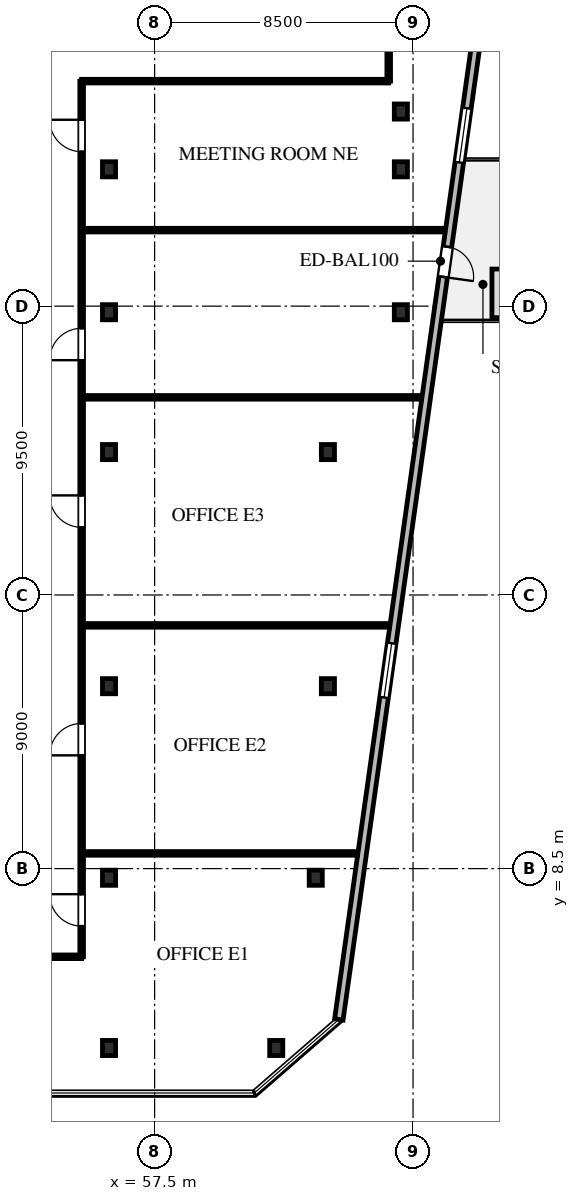
"""IFC4 building model, lengths in metres.
Left out: names, types, materials, properties, quantities, classifications, styles, units other than length and angle.
Written with IfcOpenShell. Run it as: python <this file> out.ifc"""

import sys

from ifc_helpers import new_model, si_unit, direction, frame, frame_2d, origin, origin_2d, place, context, subcontext, project, spatial, rectangle, i_section, extrude, element, fill, save


model = new_model("IFC4")
c1 = context("Model", 3, precision=1e-05, world=origin(), true_north=direction((0.0, 1.0)))
c2 = subcontext(c1, "Body", "Model", "MODEL_VIEW")
j1 = project(units=[si_unit("LENGTHUNIT", "METRE"), si_unit("PLANEANGLEUNIT", "RADIAN")], contexts=[c1])
p1 = place(None, origin())
s1 = spatial("IfcSite", under=j1, at=p1, CompositionType="ELEMENT")
p2 = place(p1, origin())
s2 = spatial("IfcBuilding", under=s1, at=p2, CompositionType="ELEMENT")
p3 = place(p2, frame((0.0, 0.0, 61.5)))
s3 = spatial("IfcBuildingStorey", under=s2, at=p3, CompositionType="ELEMENT", Elevation=61.5)
for number, where, z_axis, x_axis in (
    (1, (56.0, 14.5, 0.0), (0.0, 0.0, 1.0), (1.0, 0.0, 0.0)),
    (2, (63.2, 14.5, 0.0), (0.0, 0.0, 1.0), (1.0, 0.0, 0.0)),
    (3, (56.0, 22.2, 0.0), (0.0, 0.0, 1.0), (1.0, 0.0, 0.0)),
    (4, (63.2, 22.2, 0.0), (0.0, 0.0, 1.0), (1.0, 0.0, 0.0)),
    (5, (56.0, 26.8, 0.0), (0.0, 0.0, 1.0), (1.0, 0.0, 0.0)),
    (6, (65.6, 26.8, 0.0), (0.0, 0.0, 1.0), (1.0, 0.0, 0.0)),
    (7, (56.0, 31.5, 0.0), (0.0, 0.0, 1.0), (1.0, 0.0, 0.0)),
    (8, (65.6, 31.5, 0.0), (0.0, 0.0, 1.0), (1.0, 0.0, 0.0)),
    (9, (56.0, 2.6, 0.0), (0.0, 0.0, 1.0), (1.0, 0.0, 0.0)),
    (10, (61.5, 2.6, 0.0), (0.0, 0.0, 1.0), (1.0, 0.0, 0.0)),
    (11, (56.0, 8.2, 0.0), (0.0, 0.0, 1.0), (1.0, 0.0, 0.0)),
    (12, (62.8, 8.2, 0.0), (0.0, 0.0, 1.0), (1.0, 0.0, 0.0)),
    (13, (65.6, 33.4, 0.0), (0.0, 0.0, 1.0), (1.0, 0.0, 0.0)),
):
    element("IfcColumn", number, at=place(p3, frame(where, z_axis=z_axis, x_axis=x_axis)), inside=s3, PredefinedType="COLUMN", context=c2, shape_type="SweptSolid", body=[
        extrude(i_section(OverallWidth=0.432, OverallDepth=0.498, WebThickness=0.056, FlangeThickness=0.089, FilletRadius=0.03, at=origin_2d()), origin(), (0.0, 0.0, 1.0), 4.0),
    ])
p4 = place(p3, frame((68.375, 37.8, 0.0), z_axis=(0.0, 0.0, 1.0), x_axis=(-0.139174610616, -0.990267856572, 0.0)))
e14 = element("IfcWall", 14, at=p4, inside=s3, PredefinedType="STANDARD", context=c2, shape_type="SweptSolid", body=[
    extrude(rectangle(XDim=34.6, YDim=0.28, at=frame_2d((17.3, 0.0))), origin(), (0.0, 0.0, 1.0), 3.74),
])
p5 = place(p4, frame((8.935, 0.0, 0.0)))
e15 = element("IfcOpeningElement", 15, at=p5, cuts=e14, PredefinedType="OPENING", context=c2, shape_type="SweptSolid", body=[
    extrude(rectangle(XDim=1.0, YDim=2.15, at=frame_2d((0.5, 1.075))), frame((0.0, 0.15, 0.0), z_axis=(0.0, -1.0, 0.0), x_axis=(1.0, 0.0, 0.0)), (0.0, 0.0, 1.0), 0.3),
])
p6 = place(p4, frame((4.333, 0.0, 0.65)))
e16 = element("IfcOpeningElement", 16, at=p6, cuts=e14, PredefinedType="OPENING", context=c2, shape_type="SweptSolid", body=[
    extrude(rectangle(XDim=1.8, YDim=2.1, at=frame_2d((0.9, 1.05))), frame((0.0, 0.15, 0.0), z_axis=(0.0, -1.0, 0.0), x_axis=(1.0, 0.0, 0.0)), (0.0, 0.0, 1.0), 0.3),
])
p7 = place(p4, frame((22.104, 0.0, 0.65)))
e17 = element("IfcOpeningElement", 17, at=p7, cuts=e14, PredefinedType="OPENING", context=c2, shape_type="SweptSolid", body=[
    extrude(rectangle(XDim=1.8, YDim=2.1, at=frame_2d((0.9, 1.05))), frame((0.0, 0.15, 0.0), z_axis=(0.0, -1.0, 0.0), x_axis=(1.0, 0.0, 0.0)), (0.0, 0.0, 1.0), 0.3),
])
p8 = place(p3, frame((55.1, 34.4, 0.0), z_axis=(0.0, 0.0, 1.0), x_axis=(1.0, 0.0, 0.0)))
e18 = element("IfcWall", 18, at=p8, inside=s3, PredefinedType="PARTITIONING", context=c2, shape_type="SweptSolid", body=[
    extrude(rectangle(XDim=10.1, YDim=0.12, at=frame_2d((5.05, 0.0))), origin(), (0.0, 0.0, 1.0), 2.813),
])
p9 = place(p3, frame((65.2, 34.4, 0.0), z_axis=(0.0, 0.0, 1.0), x_axis=(0.0, 1.0, 0.0)))
e19 = element("IfcWall", 19, at=p9, inside=s3, PredefinedType="PARTITIONING", context=c2, shape_type="SweptSolid", body=[
    extrude(rectangle(XDim=3.217, YDim=0.12, at=frame_2d((1.608, 0.0))), origin(), (0.0, 0.0, 1.0), 2.813),
])
p10 = place(p3, frame((55.1, 5.6, 0.0), z_axis=(0.0, 0.0, 1.0), x_axis=(0.0, 1.0, 0.0)))
e20 = element("IfcWall", 20, at=p10, inside=s3, PredefinedType="PARTITIONING", context=c2, shape_type="SweptSolid", body=[
    extrude(rectangle(XDim=28.8, YDim=0.12, at=frame_2d((14.4, 0.0))), origin(), (0.0, 0.0, 1.0), 2.813),
])
p11 = place(p10, frame((1.009, 0.0, 0.0)))
e21 = element("IfcOpeningElement", 21, at=p11, cuts=e20, PredefinedType="OPENING", context=c2, shape_type="SweptSolid", body=[
    extrude(rectangle(XDim=1.05, YDim=2.2, at=frame_2d((0.525, 1.1))), frame((0.0, 0.07, 0.0), z_axis=(0.0, -1.0, 0.0), x_axis=(1.0, 0.0, 0.0)), (0.0, 0.0, 1.0), 0.14),
])
p12 = place(p10, frame((6.625, 0.0, 0.0)))
e22 = element("IfcOpeningElement", 22, at=p12, cuts=e20, PredefinedType="OPENING", context=c2, shape_type="SweptSolid", body=[
    extrude(rectangle(XDim=1.05, YDim=2.2, at=frame_2d((0.525, 1.1))), frame((0.0, 0.07, 0.0), z_axis=(0.0, -1.0, 0.0), x_axis=(1.0, 0.0, 0.0)), (0.0, 0.0, 1.0), 0.14),
])
p13 = place(p10, frame((14.125, 0.0, 0.0)))
e23 = element("IfcOpeningElement", 23, at=p13, cuts=e20, PredefinedType="OPENING", context=c2, shape_type="SweptSolid", body=[
    extrude(rectangle(XDim=1.05, YDim=2.2, at=frame_2d((0.525, 1.1))), frame((0.0, 0.07, 0.0), z_axis=(0.0, -1.0, 0.0), x_axis=(1.0, 0.0, 0.0)), (0.0, 0.0, 1.0), 0.14),
])
p14 = place(p10, frame((19.623, 0.0, 0.0)))
e24 = element("IfcOpeningElement", 24, at=p14, cuts=e20, PredefinedType="OPENING", context=c2, shape_type="SweptSolid", body=[
    extrude(rectangle(XDim=1.05, YDim=2.2, at=frame_2d((0.525, 1.1))), frame((0.0, 0.07, 0.0), z_axis=(0.0, -1.0, 0.0), x_axis=(1.0, 0.0, 0.0)), (0.0, 0.0, 1.0), 0.14),
])
p15 = place(p10, frame((26.48, 0.0, 0.0)))
e25 = element("IfcOpeningElement", 25, at=p15, cuts=e20, PredefinedType="OPENING", context=c2, shape_type="SweptSolid", body=[
    extrude(rectangle(XDim=1.05, YDim=2.2, at=frame_2d((0.525, 1.1))), frame((0.0, 0.07, 0.0), z_axis=(0.0, -1.0, 0.0), x_axis=(1.0, 0.0, 0.0)), (0.0, 0.0, 1.0), 0.14),
])
p16 = place(p3, frame((53.1, 5.6, 0.0), z_axis=(0.0, 0.0, 1.0), x_axis=(1.0, 0.0, 0.0)))
e26 = element("IfcWall", 26, at=p16, inside=s3, PredefinedType="PARTITIONING", context=c2, shape_type="SweptSolid", body=[
    extrude(rectangle(XDim=2.0, YDim=0.12, at=frame_2d((1.0, 0.0))), origin(), (0.0, 0.0, 1.0), 2.978),
])
p17 = place(p3, frame((55.168, 9.0, 0.0), z_axis=(0.0, 0.0, 1.0), x_axis=(1.0, 0.0, 0.0)))
e27 = element("IfcWall", 27, at=p17, inside=s3, PredefinedType="PARTITIONING", context=c2, shape_type="SweptSolid", body=[
    extrude(rectangle(XDim=8.993, YDim=0.12, at=frame_2d((4.497, 0.0))), origin(), (0.0, 0.0, 1.0), 2.813),
])
p18 = place(p3, frame((55.168, 16.5, 0.0), z_axis=(0.0, 0.0, 1.0), x_axis=(1.0, 0.0, 0.0)))
e28 = element("IfcWall", 28, at=p18, inside=s3, PredefinedType="PARTITIONING", context=c2, shape_type="SweptSolid", body=[
    extrude(rectangle(XDim=10.047, YDim=0.12, at=frame_2d((5.023, 0.0))), origin(), (0.0, 0.0, 1.0), 2.813),
])
p19 = place(p3, frame((55.168, 24.0, 0.0), z_axis=(0.0, 0.0, 1.0), x_axis=(1.0, 0.0, 0.0)))
e29 = element("IfcWall", 29, at=p19, inside=s3, PredefinedType="PARTITIONING", context=c2, shape_type="SweptSolid", body=[
    extrude(rectangle(XDim=11.101, YDim=0.12, at=frame_2d((5.551, 0.0))), origin(), (0.0, 0.0, 1.0), 2.813),
])
p20 = place(p3, frame((55.168, 29.5, 0.0), z_axis=(0.0, 0.0, 1.0), x_axis=(1.0, 0.0, 0.0)))
e30 = element("IfcWall", 30, at=p20, inside=s3, PredefinedType="PARTITIONING", context=c2, shape_type="SweptSolid", body=[
    extrude(rectangle(XDim=11.874, YDim=0.12, at=frame_2d((5.937, 0.0))), origin(), (0.0, 0.0, 1.0), 2.813),
])
p21 = place(p5, origin())
e31 = element("IfcDoor", 31, at=p21, inside=s3, OperationType="SINGLE_SWING_RIGHT", PredefinedType="DOOR", context=c2, shape_type="SweptSolid", body=[
    extrude(rectangle(XDim=1.0, YDim=2.15, at=frame_2d((0.5, 1.075))), frame((0.0, 0.025, 0.0), z_axis=(0.0, -1.0, 0.0), x_axis=(1.0, 0.0, 0.0)), (0.0, 0.0, 1.0), 0.05),
])
fill(e15, e31)
p22 = place(p6, origin())
e32 = element("IfcWindow", 32, at=p22, inside=s3, PartitioningType="SINGLE_PANEL", PredefinedType="WINDOW", context=c2, shape_type="SweptSolid", body=[
    extrude(rectangle(XDim=1.8, YDim=2.1, at=frame_2d((0.9, 1.05))), frame((0.0, 0.03, 0.0), z_axis=(0.0, -1.0, 0.0), x_axis=(1.0, 0.0, 0.0)), (0.0, 0.0, 1.0), 0.06),
])
fill(e16, e32)
p23 = place(p7, origin())
e33 = element("IfcWindow", 33, at=p23, inside=s3, PartitioningType="SINGLE_PANEL", PredefinedType="WINDOW", context=c2, shape_type="SweptSolid", body=[
    extrude(rectangle(XDim=1.8, YDim=2.1, at=frame_2d((0.9, 1.05))), frame((0.0, 0.03, 0.0), z_axis=(0.0, -1.0, 0.0), x_axis=(1.0, 0.0, 0.0)), (0.0, 0.0, 1.0), 0.06),
])
fill(e17, e33)
p24 = place(p11, origin())
e34 = element("IfcDoor", 34, at=p24, inside=s3, OperationType="SINGLE_SWING_RIGHT", PredefinedType="DOOR", context=c2, shape_type="SweptSolid", body=[
    extrude(rectangle(XDim=1.05, YDim=2.2, at=frame_2d((0.525, 1.1))), frame((0.0, 0.025, 0.0), z_axis=(0.0, -1.0, 0.0), x_axis=(1.0, 0.0, 0.0)), (0.0, 0.0, 1.0), 0.05),
])
fill(e21, e34)
p25 = place(p12, origin())
e35 = element("IfcDoor", 35, at=p25, inside=s3, OperationType="SINGLE_SWING_LEFT", PredefinedType="DOOR", context=c2, shape_type="SweptSolid", body=[
    extrude(rectangle(XDim=1.05, YDim=2.2, at=frame_2d((0.525, 1.1))), frame((0.0, 0.025, 0.0), z_axis=(0.0, -1.0, 0.0), x_axis=(1.0, 0.0, 0.0)), (0.0, 0.0, 1.0), 0.05),
])
fill(e22, e35)
p26 = place(p13, origin())
e36 = element("IfcDoor", 36, at=p26, inside=s3, OperationType="SINGLE_SWING_RIGHT", PredefinedType="DOOR", context=c2, shape_type="SweptSolid", body=[
    extrude(rectangle(XDim=1.05, YDim=2.2, at=frame_2d((0.525, 1.1))), frame((0.0, 0.025, 0.0), z_axis=(0.0, -1.0, 0.0), x_axis=(1.0, 0.0, 0.0)), (0.0, 0.0, 1.0), 0.05),
])
fill(e23, e36)
p27 = place(p14, origin())
e37 = element("IfcDoor", 37, at=p27, inside=s3, OperationType="SINGLE_SWING_LEFT", PredefinedType="DOOR", context=c2, shape_type="SweptSolid", body=[
    extrude(rectangle(XDim=1.05, YDim=2.2, at=frame_2d((0.525, 1.1))), frame((0.0, 0.025, 0.0), z_axis=(0.0, -1.0, 0.0), x_axis=(1.0, 0.0, 0.0)), (0.0, 0.0, 1.0), 0.05),
])
fill(e24, e37)
p28 = place(p15, origin())
e38 = element("IfcDoor", 38, at=p28, inside=s3, OperationType="SINGLE_SWING_RIGHT", PredefinedType="DOOR", context=c2, shape_type="SweptSolid", body=[
    extrude(rectangle(XDim=1.05, YDim=2.2, at=frame_2d((0.525, 1.1))), frame((0.0, 0.025, 0.0), z_axis=(0.0, -1.0, 0.0), x_axis=(1.0, 0.0, 0.0)), (0.0, 0.0, 1.0), 0.05),
])
fill(e25, e38)
save(model, sys.argv[1])
